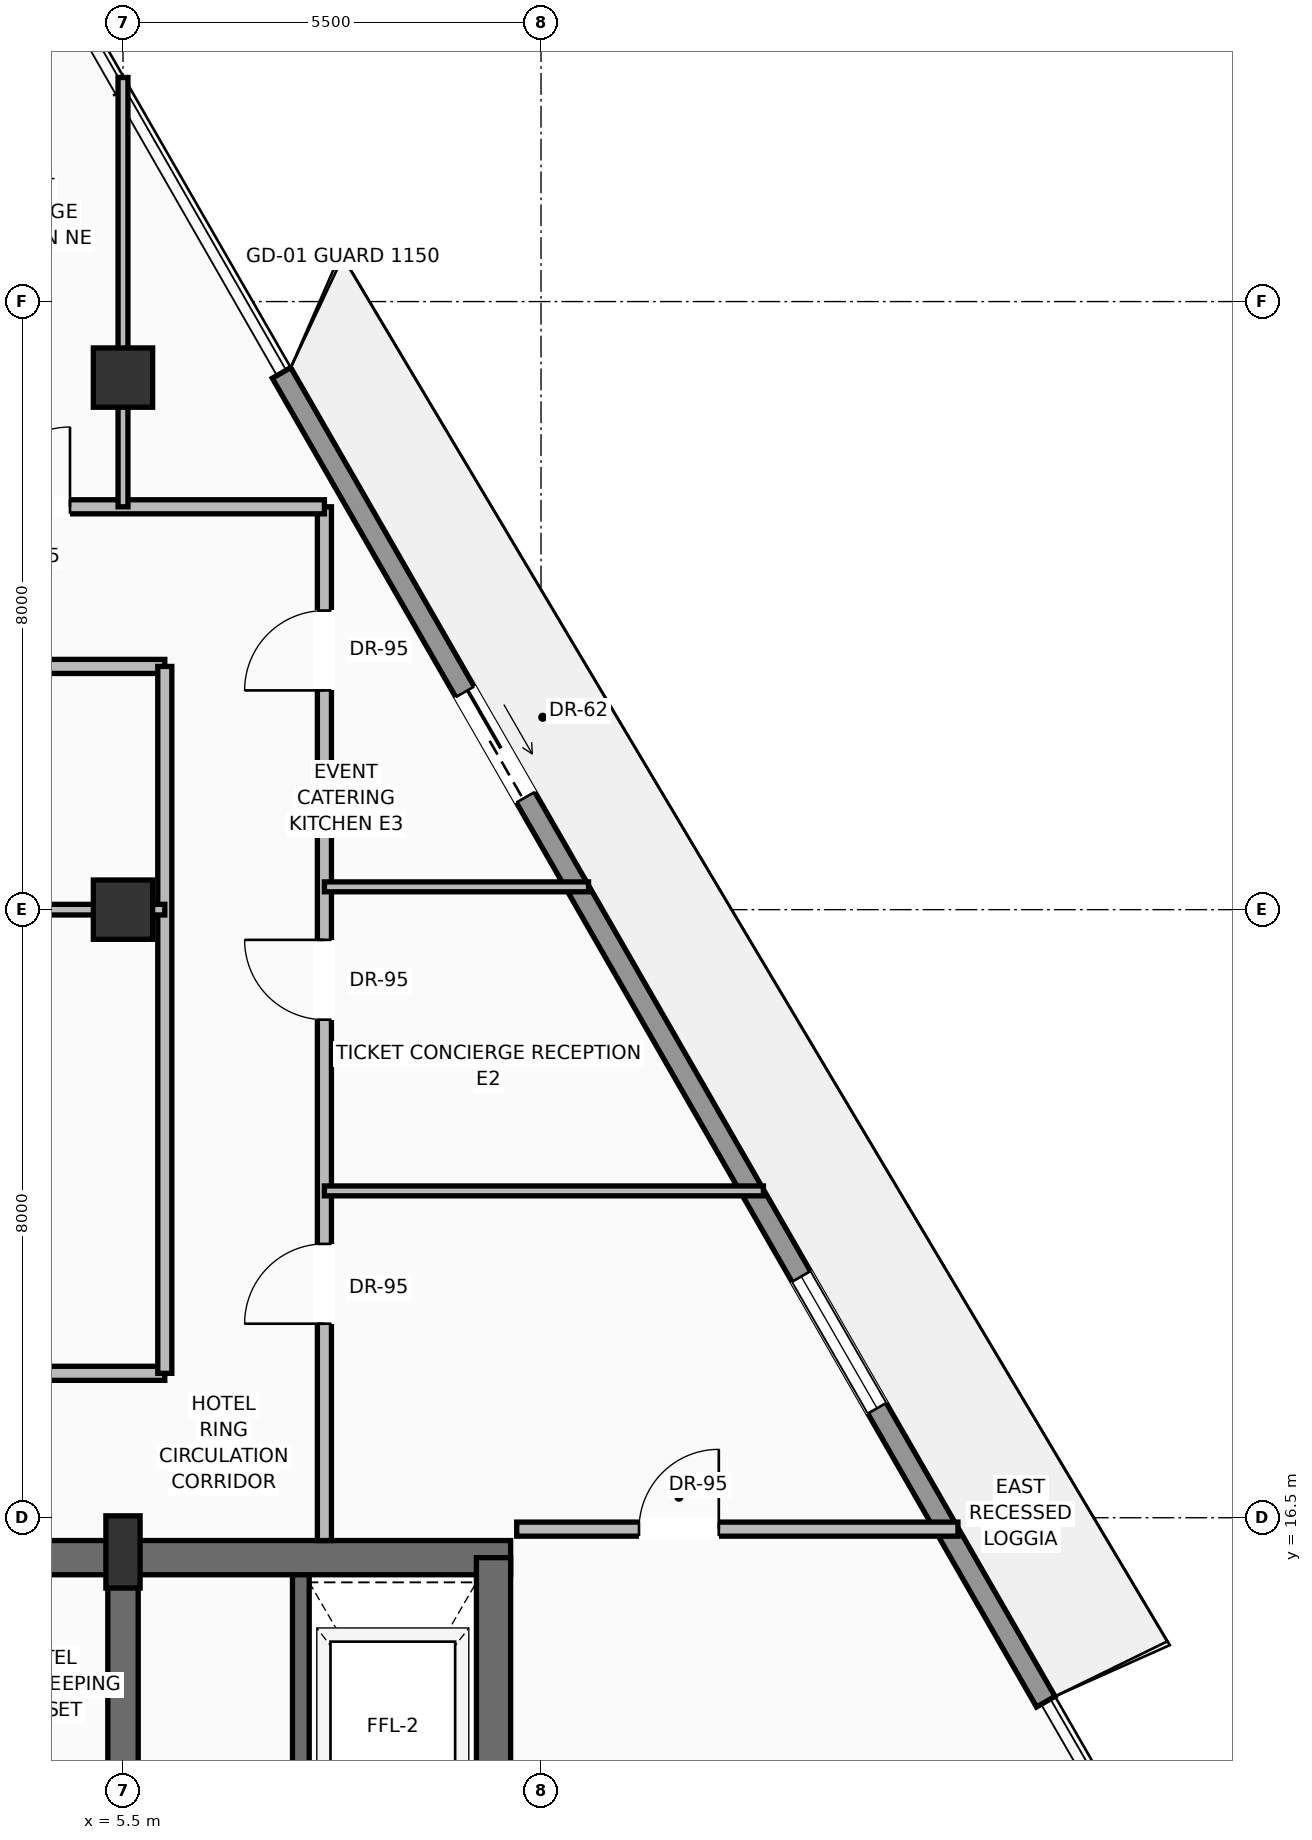
"""IFC4 building model, lengths in metres.
Left out: names, types, materials, properties, quantities, classifications, styles, units other than length and angle.
Written with IfcOpenShell. Run it as: python <this file> out.ifc"""

import sys

from ifc_helpers import new_model, si_unit, direction, frame, frame_2d, origin, origin_2d, place, context, subcontext, project, spatial, rectangle, extrude, source, transform, mapped, element, fill, save


model = new_model("IFC4")
c1 = context("Model", 3, precision=1e-05, world=origin(), true_north=direction((0.0, 1.0)))
c2 = subcontext(c1, "Body", "Model", "MODEL_VIEW")
j1 = project(units=[si_unit("LENGTHUNIT", "METRE"), si_unit("PLANEANGLEUNIT", "RADIAN")], contexts=[c1])
p1 = place(None, origin())
s1 = spatial("IfcSite", under=j1, at=p1, CompositionType="ELEMENT")
p2 = place(p1, origin())
s2 = spatial("IfcBuilding", under=s1, at=p2, CompositionType="ELEMENT")
p3 = place(p2, frame((0.0, 0.0, 297.15)))
s3 = spatial("IfcBuildingStorey", under=s2, at=p3, CompositionType="ELEMENT", Elevation=297.15)
p4 = place(p3, frame((-10.6, 15.975, 0.0), z_axis=(0.0, 0.0, 1.0), x_axis=(1.0, 0.0, 0.0)))
e1 = element("IfcWall", 1, at=p4, inside=s3, PredefinedType="SHEAR", context=c2, shape_type="SweptSolid", body=[
    extrude(rectangle(XDim=21.2, YDim=0.45, at=frame_2d((10.6, 0.0))), origin(), (0.0, 0.0, 1.0), 3.24),
])
p5 = place(p4, frame((3.17, 0.0, 0.0)))
e2 = element("IfcOpeningElement", 2, at=p5, cuts=e1, PredefinedType="OPENING", context=c2, shape_type="SweptSolid", body=[
    extrude(rectangle(XDim=1.3, YDim=2.3, at=frame_2d((0.65, 1.15))), frame((0.0, 0.235, 0.0), z_axis=(0.0, -1.0, 0.0), x_axis=(1.0, 0.0, 0.0)), (0.0, 0.0, 1.0), 0.47),
])
p6 = place(p4, frame((9.6, 0.0, 0.0)))
e3 = element("IfcOpeningElement", 3, at=p6, cuts=e1, PredefinedType="OPENING", context=c2, shape_type="SweptSolid", body=[
    extrude(rectangle(XDim=2.0, YDim=2.4, at=frame_2d((1.0, 1.2))), frame((0.0, 0.235, 0.0), z_axis=(0.0, -1.0, 0.0), x_axis=(1.0, 0.0, 0.0)), (0.0, 0.0, 1.0), 0.47),
])
p7 = place(p3, frame((10.375, 0.625, 0.0), z_axis=(0.0, 0.0, 1.0), x_axis=(0.0, 1.0, 0.0)))
e4 = element("IfcWall", 4, at=p7, inside=s3, PredefinedType="SHEAR", context=c2, shape_type="SweptSolid", body=[
    extrude(rectangle(XDim=15.35, YDim=0.45, at=frame_2d((7.675, 0.0))), origin(), (0.0, 0.0, 1.0), 3.24),
])
p8 = place(p3, frame((5.5, 0.625, 0.0), z_axis=(0.0, 0.0, 1.0), x_axis=(0.0, 1.0, 0.0)))
e5 = element("IfcWall", 5, at=p8, inside=s3, PredefinedType="SHEAR", context=c2, shape_type="SweptSolid", body=[
    extrude(rectangle(XDim=15.35, YDim=0.4, at=frame_2d((7.675, 0.0))), origin(), (0.0, 0.0, 1.0), 3.24),
])
p9 = place(p8, frame((8.875, 0.0, 0.0)))
e6 = element("IfcOpeningElement", 6, at=p9, cuts=e5, PredefinedType="OPENING", context=c2, shape_type="SweptSolid", body=[
    extrude(rectangle(XDim=1.1, YDim=2.2, at=frame_2d((0.55, 1.1))), frame((0.0, 0.21, 0.0), z_axis=(0.0, -1.0, 0.0), x_axis=(1.0, 0.0, 0.0)), (0.0, 0.0, 1.0), 0.42),
])
m1 = source(origin(), c2, "Body", "SweptSolid", [
    extrude(rectangle(XDim=0.45, YDim=0.95, at=origin_2d()), origin(), (0.0, 0.0, 1.0), 3.45),
])
p10 = place(p3, frame((5.5, 16.05, 0.0), z_axis=(0.0, 0.0, 1.0), x_axis=(1.0, 0.0, 0.0)))
e7 = element("IfcColumn", 7, at=p10, inside=s3, PredefinedType="PILASTER", context=c2, shape_type="MappedRepresentation", body=[
    mapped(m1, transform((0.0, 0.0, 0.0), scale=1.0)),
])
m2 = source(origin(), c2, "Body", "SweptSolid", [
    extrude(rectangle(XDim=0.78, YDim=0.78, at=origin_2d()), origin(), (0.0, 0.0, 1.0), 3.45),
])
for number, where, z_axis, x_axis in (
    (8, (5.5, 24.5, 0.0), (0.0, 0.0, 1.0), (1.0, 0.0, 0.0)),
    (9, (5.5, 31.5, 0.0), (0.0, 0.0, 1.0), (1.0, 0.0, 0.0)),
):
    element("IfcColumn", number, at=place(p3, frame(where, z_axis=z_axis, x_axis=x_axis)), inside=s3, PredefinedType="COLUMN", context=c2, shape_type="MappedRepresentation", body=[
        mapped(m2, transform((0.0, 0.0, 0.0), scale=1.0)),
    ])
p11 = place(p3, frame((7.586, 31.561, 0.0), z_axis=(0.0, 0.0, 1.0), x_axis=(0.498604857305, -0.866829392829, 0.0)))
e10 = element("IfcWall", 10, at=p11, inside=s3, PredefinedType="SOLIDWALL", context=c2, shape_type="SweptSolid", body=[
    extrude(rectangle(XDim=20.167, YDim=0.28, at=frame_2d((10.083, 0.0))), origin(), (0.0, 0.0, 1.0), 2.82),
])
p12 = place(p11, frame((4.84, 0.0, 0.0)))
e11 = element("IfcOpeningElement", 11, at=p12, cuts=e10, PredefinedType="OPENING", context=c2, shape_type="SweptSolid", body=[
    extrude(rectangle(XDim=1.6, YDim=2.35, at=frame_2d((0.8, 1.175))), frame((0.0, 0.15, 0.0), z_axis=(0.0, -1.0, 0.0), x_axis=(1.0, 0.0, 0.0)), (0.0, 0.0, 1.0), 0.3),
])
p13 = place(p11, frame((13.714, 0.0, 0.9)))
e12 = element("IfcOpeningElement", 12, at=p13, cuts=e10, PredefinedType="OPENING", context=c2, shape_type="SweptSolid", body=[
    extrude(rectangle(XDim=2.0, YDim=1.75, at=frame_2d((1.0, 0.875))), frame((0.0, 0.15, 0.0), z_axis=(0.0, -1.0, 0.0), x_axis=(1.0, 0.0, 0.0)), (0.0, 0.0, 1.0), 0.3),
])
p14 = place(p3, frame((7.84, 11.87, 0.0), z_axis=(0.0, 0.0, 1.0), x_axis=(0.0, 1.0, 0.0)))
e13 = element("IfcWall", 13, at=p14, inside=s3, PredefinedType="SOLIDWALL", context=c2, shape_type="SweptSolid", body=[
    extrude(rectangle(XDim=3.88, YDim=0.22, at=frame_2d((1.94, 0.0))), origin(), (0.0, 0.0, 1.0), 3.24),
])
p15 = place(p3, frame((-6.05, 18.4, 0.0), z_axis=(0.0, 0.0, 1.0), x_axis=(1.0, 0.0, 0.0)))
e14 = element("IfcWall", 14, at=p15, inside=s3, PredefinedType="PARTITIONING", context=c2, shape_type="SweptSolid", body=[
    extrude(rectangle(XDim=12.1, YDim=0.185, at=frame_2d((6.05, 0.0))), origin(), (0.0, 0.0, 1.0), 3.232),
])
p16 = place(p15, frame((5.575, 0.0, 0.0)))
e15 = element("IfcOpeningElement", 15, at=p16, cuts=e14, PredefinedType="OPENING", context=c2, shape_type="SweptSolid", body=[
    extrude(rectangle(XDim=0.95, YDim=2.2, at=frame_2d((0.475, 1.1))), frame((0.0, 0.103, 0.0), z_axis=(0.0, -1.0, 0.0), x_axis=(1.0, 0.0, 0.0)), (0.0, 0.0, 1.0), 0.205),
])
p17 = place(p3, frame((-6.05, 27.7, 0.0), z_axis=(0.0, 0.0, 1.0), x_axis=(1.0, 0.0, 0.0)))
e16 = element("IfcWall", 16, at=p17, inside=s3, PredefinedType="PARTITIONING", context=c2, shape_type="SweptSolid", body=[
    extrude(rectangle(XDim=12.1, YDim=0.185, at=frame_2d((6.05, 0.0))), origin(), (0.0, 0.0, 1.0), 2.885),
])
p18 = place(p17, frame((5.575, 0.0, 0.0)))
e17 = element("IfcOpeningElement", 17, at=p18, cuts=e16, PredefinedType="OPENING", context=c2, shape_type="SweptSolid", body=[
    extrude(rectangle(XDim=0.95, YDim=2.2, at=frame_2d((0.475, 1.1))), frame((0.0, 0.103, 0.0), z_axis=(0.0, -1.0, 0.0), x_axis=(1.0, 0.0, 0.0)), (0.0, 0.0, 1.0), 0.205),
])
p19 = place(p3, frame((6.05, 18.4, 0.0), z_axis=(0.0, 0.0, 1.0), x_axis=(0.0, 1.0, 0.0)))
e18 = element("IfcWall", 18, at=p19, inside=s3, PredefinedType="PARTITIONING", context=c2, shape_type="SweptSolid", body=[
    extrude(rectangle(XDim=9.3, YDim=0.185, at=frame_2d((4.65, 0.0))), origin(), (0.0, 0.0, 1.0), 3.232),
])
p20 = place(p3, frame((8.15, 16.2, 0.0), z_axis=(0.0, 0.0, 1.0), x_axis=(0.0, 1.0, 0.0)))
e19 = element("IfcWall", 19, at=p20, inside=s3, PredefinedType="PARTITIONING", context=c2, shape_type="SweptSolid", body=[
    extrude(rectangle(XDim=13.6, YDim=0.185, at=frame_2d((6.8, 0.0))), origin(), (0.0, 0.0, 1.0), 3.232),
])
p21 = place(p20, frame((2.853, 0.0, 0.0)))
e20 = element("IfcOpeningElement", 20, at=p21, cuts=e19, PredefinedType="OPENING", context=c2, shape_type="SweptSolid", body=[
    extrude(rectangle(XDim=1.05, YDim=2.25, at=frame_2d((0.525, 1.125))), frame((0.0, 0.103, 0.0), z_axis=(0.0, -1.0, 0.0), x_axis=(1.0, 0.0, 0.0)), (0.0, 0.0, 1.0), 0.205),
])
p22 = place(p20, frame((6.853, 0.0, 0.0)))
e21 = element("IfcOpeningElement", 21, at=p22, cuts=e19, PredefinedType="OPENING", context=c2, shape_type="SweptSolid", body=[
    extrude(rectangle(XDim=1.05, YDim=2.25, at=frame_2d((0.525, 1.125))), frame((0.0, 0.103, 0.0), z_axis=(0.0, -1.0, 0.0), x_axis=(1.0, 0.0, 0.0)), (0.0, 0.0, 1.0), 0.205),
])
p23 = place(p20, frame((11.185, 0.0, 0.0)))
e22 = element("IfcOpeningElement", 22, at=p23, cuts=e19, PredefinedType="OPENING", context=c2, shape_type="SweptSolid", body=[
    extrude(rectangle(XDim=1.05, YDim=2.25, at=frame_2d((0.525, 1.125))), frame((0.0, 0.103, 0.0), z_axis=(0.0, -1.0, 0.0), x_axis=(1.0, 0.0, 0.0)), (0.0, 0.0, 1.0), 0.205),
])
p24 = place(p3, frame((-8.15, 29.8, 0.0), z_axis=(0.0, 0.0, 1.0), x_axis=(1.0, 0.0, 0.0)))
e23 = element("IfcWall", 23, at=p24, inside=s3, PredefinedType="PARTITIONING", context=c2, shape_type="SweptSolid", body=[
    extrude(rectangle(XDim=16.3, YDim=0.185, at=frame_2d((8.15, 0.0))), origin(), (0.0, 0.0, 1.0), 3.232),
])
p25 = place(p24, frame((3.347, 0.0, 0.0)))
e24 = element("IfcOpeningElement", 24, at=p25, cuts=e23, PredefinedType="OPENING", context=c2, shape_type="SweptSolid", body=[
    extrude(rectangle(XDim=1.05, YDim=2.25, at=frame_2d((0.525, 1.125))), frame((0.0, 0.103, 0.0), z_axis=(0.0, -1.0, 0.0), x_axis=(1.0, 0.0, 0.0)), (0.0, 0.0, 1.0), 0.205),
])
p26 = place(p24, frame((7.625, 0.0, 0.0)))
e25 = element("IfcOpeningElement", 25, at=p26, cuts=e23, PredefinedType="OPENING", context=c2, shape_type="SweptSolid", body=[
    extrude(rectangle(XDim=1.05, YDim=2.25, at=frame_2d((0.525, 1.125))), frame((0.0, 0.103, 0.0), z_axis=(0.0, -1.0, 0.0), x_axis=(1.0, 0.0, 0.0)), (0.0, 0.0, 1.0), 0.205),
])
p27 = place(p24, frame((11.903, 0.0, 0.0)))
e26 = element("IfcOpeningElement", 26, at=p27, cuts=e23, PredefinedType="OPENING", context=c2, shape_type="SweptSolid", body=[
    extrude(rectangle(XDim=1.05, YDim=2.25, at=frame_2d((0.525, 1.125))), frame((0.0, 0.103, 0.0), z_axis=(0.0, -1.0, 0.0), x_axis=(1.0, 0.0, 0.0)), (0.0, 0.0, 1.0), 0.205),
])
p28 = place(p3, frame((-6.05, 24.5, 0.0), z_axis=(0.0, 0.0, 1.0), x_axis=(1.0, 0.0, 0.0)))
e27 = element("IfcWall", 27, at=p28, inside=s3, PredefinedType="PARTITIONING", context=c2, shape_type="SweptSolid", body=[
    extrude(rectangle(XDim=12.1, YDim=0.14, at=frame_2d((6.05, 0.0))), origin(), (0.0, 0.0, 1.0), 2.683),
])
p29 = place(p3, frame((10.68, 16.35, 0.0), z_axis=(0.0, 0.0, 1.0), x_axis=(1.0, 0.0, 0.0)))
e28 = element("IfcWall", 28, at=p29, inside=s3, PredefinedType="PARTITIONING", context=c2, shape_type="SweptSolid", body=[
    extrude(rectangle(XDim=5.806, YDim=0.185, at=frame_2d((2.903, 0.0))), origin(), (0.0, 0.0, 1.0), 3.232),
])
p30 = place(p29, frame((1.609, 0.0, 0.0)))
e29 = element("IfcOpeningElement", 29, at=p30, cuts=e28, PredefinedType="OPENING", context=c2, shape_type="SweptSolid", body=[
    extrude(rectangle(XDim=1.05, YDim=2.25, at=frame_2d((0.525, 1.125))), frame((0.0, 0.103, 0.0), z_axis=(0.0, -1.0, 0.0), x_axis=(1.0, 0.0, 0.0)), (0.0, 0.0, 1.0), 0.205),
])
p31 = place(p3, frame((5.5, 29.8, 0.0), z_axis=(0.0, 0.0, 1.0), x_axis=(0.0, 1.0, 0.0)))
e30 = element("IfcWall", 30, at=p31, inside=s3, PredefinedType="PARTITIONING", context=c2, shape_type="SweptSolid", body=[
    extrude(rectangle(XDim=5.648, YDim=0.13, at=frame_2d((2.824, 0.0))), origin(), (0.0, 0.0, 1.0), 2.683),
])
p32 = place(p3, frame((8.15, 20.8, 0.0), z_axis=(0.0, 0.0, 1.0), x_axis=(1.0, 0.0, 0.0)))
e31 = element("IfcWall", 31, at=p32, inside=s3, PredefinedType="PARTITIONING", context=c2, shape_type="SweptSolid", body=[
    extrude(rectangle(XDim=5.776, YDim=0.13, at=frame_2d((2.888, 0.0))), origin(), (0.0, 0.0, 1.0), 3.232),
])
p33 = place(p3, frame((8.15, 24.8, 0.0), z_axis=(0.0, 0.0, 1.0), x_axis=(1.0, 0.0, 0.0)))
e32 = element("IfcWall", 32, at=p33, inside=s3, PredefinedType="PARTITIONING", context=c2, shape_type="SweptSolid", body=[
    extrude(rectangle(XDim=3.475, YDim=0.13, at=frame_2d((1.738, 0.0))), origin(), (0.0, 0.0, 1.0), 3.232),
])
m3 = source(origin(), c2, "Body", "SweptSolid", [
    extrude(rectangle(XDim=1.6, YDim=2.35, at=frame_2d((0.8, 1.175))), frame((0.0, 0.025, 0.0), z_axis=(0.0, -1.0, 0.0), x_axis=(1.0, 0.0, 0.0)), (0.0, 0.0, 1.0), 0.05),
])
p34 = place(p12, origin())
e33 = element("IfcDoor", 33, at=p34, inside=s3, OperationType="SLIDING_TO_RIGHT", PredefinedType="DOOR", context=c2, shape_type="MappedRepresentation", body=[
    mapped(m3, transform((0.0, 0.0, 0.0), scale=1.0)),
])
fill(e11, e33)
m4 = source(origin(), c2, "Body", "SweptSolid", [
    extrude(rectangle(XDim=2.0, YDim=1.75, at=frame_2d((1.0, 0.875))), frame((0.0, 0.03, 0.0), z_axis=(0.0, -1.0, 0.0), x_axis=(1.0, 0.0, 0.0)), (0.0, 0.0, 1.0), 0.06),
])
p35 = place(p13, origin())
e34 = element("IfcWindow", 34, at=p35, inside=s3, PartitioningType="SINGLE_PANEL", PredefinedType="WINDOW", context=c2, shape_type="MappedRepresentation", body=[
    mapped(m4, transform((0.0, 0.0, 0.0), scale=1.0)),
])
fill(e12, e34)
m5 = source(origin(), c2, "Body", "SweptSolid", [
    extrude(rectangle(XDim=1.05, YDim=2.25, at=frame_2d((0.525, 1.125))), frame((0.0, 0.025, 0.0), z_axis=(0.0, -1.0, 0.0), x_axis=(1.0, 0.0, 0.0)), (0.0, 0.0, 1.0), 0.05),
])
p36 = place(p30, origin())
e35 = element("IfcDoor", 35, at=p36, inside=s3, OperationType="SINGLE_SWING_RIGHT", PredefinedType="DOOR", context=c2, shape_type="MappedRepresentation", body=[
    mapped(m5, transform((0.0, 0.0, 0.0), scale=1.0)),
])
fill(e29, e35)
p37 = place(p21, origin())
e36 = element("IfcDoor", 36, at=p37, inside=s3, OperationType="SINGLE_SWING_LEFT", PredefinedType="DOOR", context=c2, shape_type="MappedRepresentation", body=[
    mapped(m5, transform((0.0, 0.0, 0.0), scale=1.0)),
])
fill(e20, e36)
p38 = place(p22, origin())
e37 = element("IfcDoor", 37, at=p38, inside=s3, OperationType="SINGLE_SWING_RIGHT", PredefinedType="DOOR", context=c2, shape_type="MappedRepresentation", body=[
    mapped(m5, transform((0.0, 0.0, 0.0), scale=1.0)),
])
fill(e21, e37)
p39 = place(p23, origin())
e38 = element("IfcDoor", 38, at=p39, inside=s3, OperationType="SINGLE_SWING_LEFT", PredefinedType="DOOR", context=c2, shape_type="MappedRepresentation", body=[
    mapped(m5, transform((0.0, 0.0, 0.0), scale=1.0)),
])
fill(e22, e38)
p40 = place(p27, origin())
e39 = element("IfcDoor", 39, at=p40, inside=s3, OperationType="SINGLE_SWING_RIGHT", PredefinedType="DOOR", context=c2, shape_type="MappedRepresentation", body=[
    mapped(m5, transform((0.0, 0.0, 0.0), scale=1.0)),
])
fill(e26, e39)
save(model, sys.argv[1])
